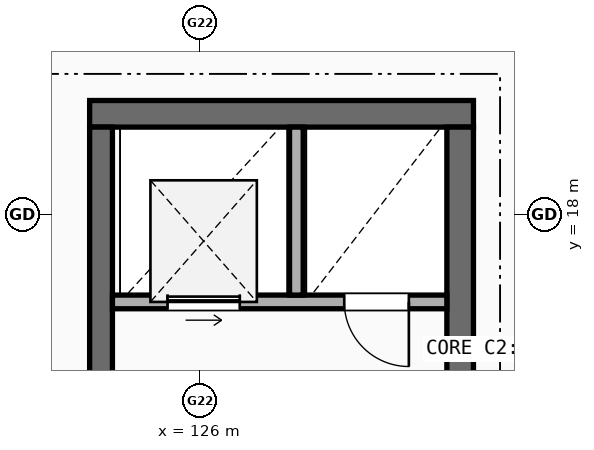
"""IFC4 building model, lengths in metres.
Left out: names, types, materials, properties, quantities, classifications, styles, units other than length and angle.
Written with IfcOpenShell. Run it as: python <this file> out.ifc"""

import sys

from ifc_helpers import new_model, si_unit, direction, frame, frame_2d, origin, place, context, subcontext, project, spatial, rectangle, extrude, element, fill, save


model = new_model("IFC4")
c1 = context("Model", 3, precision=1e-05, world=origin(), true_north=direction((0.0, 1.0)))
c2 = subcontext(c1, "Body", "Model", "MODEL_VIEW")
j1 = project(units=[si_unit("LENGTHUNIT", "METRE"), si_unit("PLANEANGLEUNIT", "RADIAN")], contexts=[c1])
p1 = place(None, origin())
s1 = spatial("IfcSite", under=j1, at=p1, CompositionType="ELEMENT")
p2 = place(p1, origin())
s2 = spatial("IfcBuilding", under=s1, at=p2, CompositionType="ELEMENT")
p3 = place(p2, frame((0.0, 0.0, 10.9)))
s3 = spatial("IfcBuildingStorey", under=s2, at=p3, CompositionType="ELEMENT", Elevation=10.9)
p4 = place(p3, frame((129.6, 19.325, 0.0), z_axis=(0.0, 0.0, 1.0), x_axis=(-1.0, 0.0, 0.0)))
e1 = element("IfcWall", 1, at=p4, inside=s3, PredefinedType="SHEAR", context=c2, shape_type="SweptSolid", body=[
    extrude(rectangle(XDim=5.05, YDim=0.35, at=frame_2d((2.525, 0.0))), origin(), (0.0, 0.0, 1.0), 2.96),
])
p5 = place(p3, frame((129.425, 12.75, 0.0), z_axis=(0.0, 0.0, 1.0), x_axis=(0.0, 1.0, 0.0)))
e2 = element("IfcWall", 2, at=p5, inside=s3, PredefinedType="SHEAR", context=c2, shape_type="SweptSolid", body=[
    extrude(rectangle(XDim=6.4, YDim=0.35, at=frame_2d((3.2, 0.0))), origin(), (0.0, 0.0, 1.0), 2.96),
])
p6 = place(p3, frame((124.7, 15.7, 0.0), z_axis=(0.0, 0.0, 1.0), x_axis=(0.0, 1.0, 0.0)))
e3 = element("IfcWall", 3, at=p6, inside=s3, PredefinedType="SHEAR", context=c2, shape_type="SweptSolid", body=[
    extrude(rectangle(XDim=3.45, YDim=0.3, at=frame_2d((1.725, 0.0))), origin(), (0.0, 0.0, 1.0), 2.96),
])
p7 = place(p3, frame((124.85, 16.85, 0.0), z_axis=(0.0, 0.0, 1.0), x_axis=(1.0, 0.0, 0.0)))
e4 = element("IfcWall", 4, at=p7, inside=s3, PredefinedType="SOLIDWALL", context=c2, shape_type="SweptSolid", body=[
    extrude(rectangle(XDim=4.4, YDim=0.18, at=frame_2d((2.2, 0.0))), origin(), (0.0, 0.0, 1.0), 2.96),
])
p8 = place(p7, frame((0.725, 0.0, 0.0)))
e5 = element("IfcOpeningElement", 5, at=p8, cuts=e4, PredefinedType="OPENING", context=c2, shape_type="SweptSolid", body=[
    extrude(rectangle(XDim=0.95, YDim=2.15, at=frame_2d((0.475, 1.075))), frame((0.0, 0.1, 0.0), z_axis=(0.0, -1.0, 0.0), x_axis=(1.0, 0.0, 0.0)), (0.0, 0.0, 1.0), 0.2),
])
p9 = place(p7, frame((3.05, 0.0, 0.0)))
e6 = element("IfcOpeningElement", 6, at=p9, cuts=e4, PredefinedType="OPENING", context=c2, shape_type="SweptSolid", body=[
    extrude(rectangle(XDim=0.85, YDim=2.1, at=frame_2d((0.425, 1.05))), frame((0.0, 0.1, 0.0), z_axis=(0.0, -1.0, 0.0), x_axis=(1.0, 0.0, 0.0)), (0.0, 0.0, 1.0), 0.2),
])
p10 = place(p3, frame((127.27, 16.94, 0.0), z_axis=(0.0, 0.0, 1.0), x_axis=(0.0, 1.0, 0.0)))
e7 = element("IfcWall", 7, at=p10, inside=s3, PredefinedType="SOLIDWALL", context=c2, shape_type="SweptSolid", body=[
    extrude(rectangle(XDim=2.21, YDim=0.18, at=frame_2d((1.105, 0.0))), origin(), (0.0, 0.0, 1.0), 2.96),
])
p11 = place(p8, origin())
e8 = element("IfcDoor", 8, at=p11, inside=s3, OperationType="SLIDING_TO_LEFT", PredefinedType="DOOR", context=c2, shape_type="SweptSolid", body=[
    extrude(rectangle(XDim=0.95, YDim=2.15, at=frame_2d((0.475, 1.075))), frame((0.0, 0.025, 0.0), z_axis=(0.0, -1.0, 0.0), x_axis=(1.0, 0.0, 0.0)), (0.0, 0.0, 1.0), 0.05),
])
fill(e5, e8)
p12 = place(p9, frame((0.85, 0.0, 0.0), z_axis=(0.0, 0.0, 1.0), x_axis=(-1.0, 0.0, 0.0)))
e9 = element("IfcDoor", 9, at=p12, inside=s3, OperationType="SINGLE_SWING_RIGHT", PredefinedType="DOOR", context=c2, shape_type="SweptSolid", body=[
    extrude(rectangle(XDim=0.85, YDim=2.1, at=frame_2d((0.425, 1.05))), frame((0.0, 0.025, 0.0), z_axis=(0.0, -1.0, 0.0), x_axis=(1.0, 0.0, 0.0)), (0.0, 0.0, 1.0), 0.05),
])
fill(e6, e9)
save(model, sys.argv[1])
